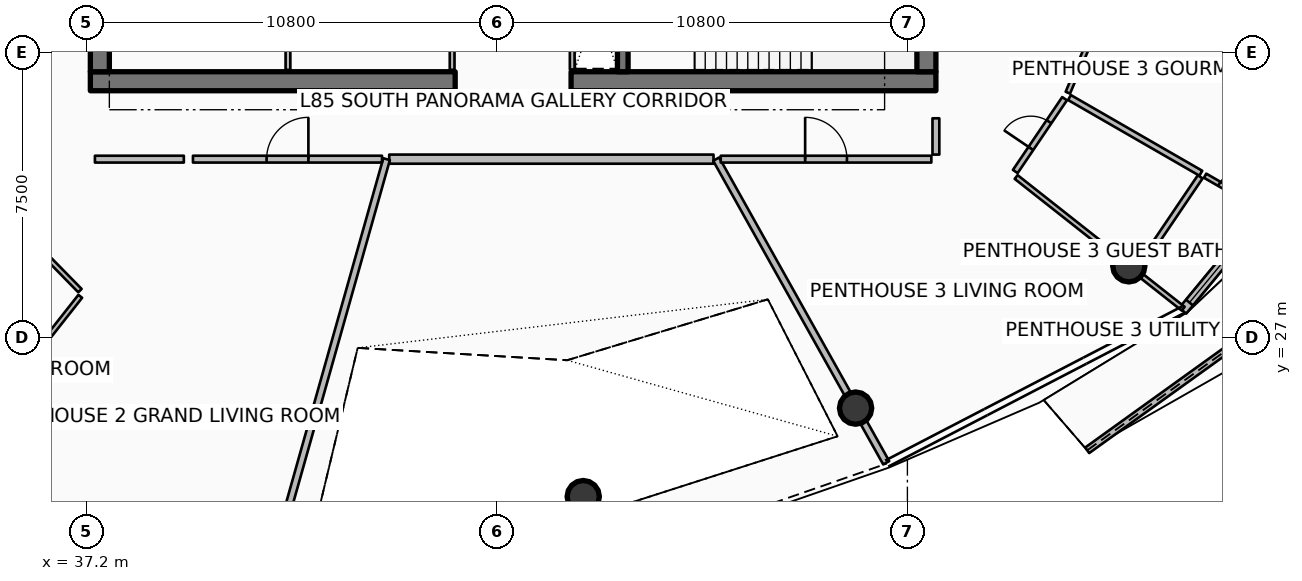
"""IFC4 building model, lengths in metres.
Left out: names, types, materials, properties, quantities, classifications, styles, units other than length and angle.
Written with IfcOpenShell. Run it as: python <this file> out.ifc"""

import sys

from ifc_helpers import new_model, si_unit, direction, frame, frame_2d, origin, origin_2d, place, context, subcontext, project, spatial, polyline, rectangle, circle, outline, extrude, element, fill, save


model = new_model("IFC4")
c1 = context("Model", 3, precision=1e-05, world=origin(), true_north=direction((0.0, 1.0)))
c2 = subcontext(c1, "Body", "Model", "MODEL_VIEW")
j1 = project(units=[si_unit("LENGTHUNIT", "METRE"), si_unit("PLANEANGLEUNIT", "RADIAN")], contexts=[c1])
p1 = place(None, origin())
s1 = spatial("IfcSite", under=j1, at=p1, CompositionType="ELEMENT")
p2 = place(p1, origin())
s2 = spatial("IfcBuilding", under=s1, at=p2, CompositionType="ELEMENT")
p3 = place(p2, frame((0.0, 0.0, 338.9)))
s3 = spatial("IfcBuildingStorey", under=s2, at=p3, CompositionType="ELEMENT", Elevation=338.9)
p4 = place(p3, frame((37.3, 33.75, 0.0), z_axis=(0.0, 0.0, 1.0), x_axis=(1.0, 0.0, 0.0)))
e1 = element("IfcWall", 1, at=p4, inside=s3, PredefinedType="SHEAR", context=c2, shape_type="SweptSolid", body=[
    extrude(rectangle(XDim=9.6, YDim=0.5, at=frame_2d((4.8, 0.0))), origin(), (0.0, 0.0, 1.0), 4.2),
])
p5 = place(p3, frame((49.95, 33.75, 0.0), z_axis=(0.0, 0.0, 1.0), x_axis=(1.0, 0.0, 0.0)))
e2 = element("IfcWall", 2, at=p5, inside=s3, PredefinedType="SHEAR", context=c2, shape_type="SweptSolid", body=[
    extrude(rectangle(XDim=9.6, YDim=0.5, at=frame_2d((4.8, 0.0))), origin(), (0.0, 0.0, 1.0), 4.2),
])
for number, where, z_axis, x_axis in (
    (3, (37.55, 34.0, 0.0), (0.0, 0.0, 1.0), (0.0, 1.0, 0.0)),
    (4, (59.3, 34.0, 0.0), (0.0, 0.0, 1.0), (0.0, 1.0, 0.0)),
):
    element("IfcWall", number, at=place(p3, frame(where, z_axis=z_axis, x_axis=x_axis)), inside=s3, PredefinedType="SHEAR", context=c2, shape_type="SweptSolid", body=[
        extrude(rectangle(XDim=16.0, YDim=0.5, at=frame_2d((8.0, 0.0))), origin(), (0.0, 0.0, 1.0), 4.2),
    ])
p6 = place(p3, frame((51.31, 34.0, 0.0), z_axis=(0.0, 0.0, 1.0), x_axis=(0.0, 1.0, 0.0)))
e5 = element("IfcWall", 5, at=p6, inside=s3, PredefinedType="SHEAR", context=c2, shape_type="SweptSolid", body=[
    extrude(rectangle(XDim=3.5, YDim=0.28, at=frame_2d((1.75, 0.0))), origin(), (0.0, 0.0, 1.0), 4.2),
])
for number, where, z_axis, x_axis in (
    (6, (50.27, 22.821, 0.0), (0.0, 0.0, 1.0), (1.0, 0.0, 0.0)),
    (7, (57.437, 25.149, 0.0), (0.0, 0.0, 1.0), (1.0, 0.0, 0.0)),
    (8, (64.626, 28.893, 0.0), (0.0, 0.0, 1.0), (1.0, 0.0, 0.0)),
):
    element("IfcColumn", number, at=place(p3, frame(where, z_axis=z_axis, x_axis=x_axis)), inside=s3, PredefinedType="COLUMN", context=c2, shape_type="SweptSolid", body=[
        extrude(circle(Radius=0.425, at=origin_2d()), origin(), (0.0, 0.0, 1.0), 3.8),
    ])
p7 = place(p3, frame((63.531, 24.039, 0.0), z_axis=(0.0, 0.0, 1.0), x_axis=(0.812019730163, 0.583629983659, 0.0)))
e9 = element("IfcWall", 9, at=p7, inside=s3, PredefinedType="PARAPET", context=c2, shape_type="SweptSolid", body=[
    extrude(outline(polyline([(0.0, 0.0), (9.954, 0.0), (9.954, 1.632), (4.977, 1.418), (0.0, 1.233), (0.0, 0.0)])), frame((0.0, 0.09, 0.0), z_axis=(0.0, -1.0, 0.0), x_axis=(1.0, 0.0, 0.0)), (0.0, 0.0, 1.0), 0.18),
])
p8 = place(p3, frame((66.045, 27.711, 0.0), z_axis=(0.0, 0.0, 1.0), x_axis=(0.636803612721, 0.771026042897, 0.0)))
e10 = element("IfcWall", 10, at=p8, inside=s3, PredefinedType="SOLIDWALL", context=c2, shape_type="SweptSolid", body=[
    extrude(rectangle(XDim=9.728, YDim=0.24, at=frame_2d((4.864, 0.0))), origin(), (0.0, 0.0, 1.0), 2.75),
])
p9 = place(p8, frame((7.508, 0.0, 0.0)))
e11 = element("IfcOpeningElement", 11, at=p9, cuts=e10, PredefinedType="OPENING", context=c2, shape_type="SweptSolid", body=[
    extrude(rectangle(XDim=1.45, YDim=2.15, at=frame_2d((0.725, 1.075))), frame((0.0, 0.13, 0.0), z_axis=(0.0, -1.0, 0.0), x_axis=(1.0, 0.0, 0.0)), (0.0, 0.0, 1.0), 0.26),
])
p10 = place(p8, frame((0.28, 0.0, 0.65)))
e12 = element("IfcOpeningElement", 12, at=p10, cuts=e10, PredefinedType="OPENING", context=c2, shape_type="SweptSolid", body=[
    extrude(rectangle(XDim=1.6, YDim=1.5, at=frame_2d((0.8, 0.75))), frame((0.0, 0.13, 0.0), z_axis=(0.0, -1.0, 0.0), x_axis=(1.0, 0.0, 0.0)), (0.0, 0.0, 1.0), 0.26),
])
for number, where, z_axis, x_axis in (
    (13, (46.82, 34.05, 0.0), (0.0, 0.0, 1.0), (0.0, 1.0, 0.0)),
    (14, (42.5, 34.05, 0.0), (0.0, 0.0, 1.0), (0.0, 1.0, 0.0)),
):
    element("IfcWall", number, at=place(p3, frame(where, z_axis=z_axis, x_axis=x_axis)), inside=s3, PredefinedType="PARTITIONING", context=c2, shape_type="SweptSolid", body=[
        extrude(rectangle(XDim=2.03, YDim=0.125, at=frame_2d((1.015, 0.0))), origin(), (0.0, 0.0, 1.0), 3.24),
    ])
p11 = place(p3, frame((49.98, 34.06, 0.0), z_axis=(0.0, 0.0, 1.0), x_axis=(0.0, 1.0, 0.0)))
e15 = element("IfcWall", 15, at=p11, inside=s3, PredefinedType="PARTITIONING", context=c2, shape_type="SweptSolid", body=[
    extrude(rectangle(XDim=3.4, YDim=0.125, at=frame_2d((1.7, 0.0))), origin(), (0.0, 0.0, 1.0), 3.24),
])
p12 = place(p3, frame((45.165, 31.7, 0.0), z_axis=(0.0, 0.0, 1.0), x_axis=(1.0, 0.0, 0.0)))
e16 = element("IfcWall", 16, at=p12, inside=s3, PredefinedType="SOLIDWALL", context=c2, shape_type="SweptSolid", body=[
    extrude(rectangle(XDim=8.533, YDim=0.24, at=frame_2d((4.267, 0.0))), origin(), (0.0, 0.0, 1.0), 3.24),
])
p13 = place(p3, frame((45.095, 31.7, 0.0), z_axis=(0.0, 0.0, 1.0), x_axis=(-0.271453030279, -0.962451688321, 0.0)))
e17 = element("IfcWall", 17, at=p13, inside=s3, PredefinedType="PARTITIONING", context=c2, shape_type="SweptSolid", body=[
    extrude(rectangle(XDim=12.191, YDim=0.18, at=frame_2d((6.096, 0.0))), origin(), (0.0, 0.0, 1.0), 3.24),
])
p14 = place(p3, frame((53.768, 31.7, 0.0), z_axis=(0.0, 0.0, 1.0), x_axis=(0.488623665245, -0.872494649704, 0.0)))
e18 = element("IfcWall", 18, at=p14, inside=s3, PredefinedType="PARTITIONING", context=c2, shape_type="SweptSolid", body=[
    extrude(rectangle(XDim=9.157, YDim=0.18, at=frame_2d((4.579, 0.0))), origin(), (0.0, 0.0, 1.0), 3.24),
])
p15 = place(p3, frame((40.0, 31.7, 0.0), z_axis=(0.0, 0.0, 1.0), x_axis=(1.0, 0.0, 0.0)))
e19 = element("IfcWall", 19, at=p15, inside=s3, PredefinedType="PARTITIONING", context=c2, shape_type="SweptSolid", body=[
    extrude(rectangle(XDim=4.975, YDim=0.18, at=frame_2d((2.488, 0.0))), origin(), (0.0, 0.0, 1.0), 3.24),
])
p16 = place(p15, frame((1.938, 0.0, 0.0)))
e20 = element("IfcOpeningElement", 20, at=p16, cuts=e19, PredefinedType="OPENING", context=c2, shape_type="SweptSolid", body=[
    extrude(rectangle(XDim=1.1, YDim=2.1, at=frame_2d((0.55, 1.05))), frame((0.0, 0.1, 0.0), z_axis=(0.0, -1.0, 0.0), x_axis=(1.0, 0.0, 0.0)), (0.0, 0.0, 1.0), 0.2),
])
p17 = place(p3, frame((37.42, 31.7, 0.0), z_axis=(0.0, 0.0, 1.0), x_axis=(1.0, 0.0, 0.0)))
e21 = element("IfcWall", 21, at=p17, inside=s3, PredefinedType="PARTITIONING", context=c2, shape_type="SweptSolid", body=[
    extrude(rectangle(XDim=2.34, YDim=0.18, at=frame_2d((1.17, 0.0))), origin(), (0.0, 0.0, 1.0), 3.24),
])
p18 = place(p3, frame((37.035, 28.091, 0.0), z_axis=(0.0, 0.0, 1.0), x_axis=(-0.619085814128, -0.785323344072, 0.0)))
e22 = element("IfcWall", 22, at=p18, inside=s3, PredefinedType="PARTITIONING", context=c2, shape_type="SweptSolid", body=[
    extrude(rectangle(XDim=7.415, YDim=0.125, at=frame_2d((3.708, 0.0))), origin(), (0.0, 0.0, 1.0), 3.24),
])
p19 = place(p3, frame((34.001, 31.33, 0.0), z_axis=(0.0, 0.0, 1.0), x_axis=(0.699699856998, -0.714436918221, 0.0)))
e23 = element("IfcWall", 23, at=p19, inside=s3, PredefinedType="PARTITIONING", context=c2, shape_type="SweptSolid", body=[
    extrude(rectangle(XDim=4.324, YDim=0.125, at=frame_2d((2.162, 0.0))), origin(), (0.0, 0.0, 1.0), 3.24),
])
p20 = place(p19, frame((1.712, 0.0, 0.0)))
e24 = element("IfcOpeningElement", 24, at=p20, cuts=e23, PredefinedType="OPENING", context=c2, shape_type="SweptSolid", body=[
    extrude(rectangle(XDim=0.9, YDim=2.08, at=frame_2d((0.45, 1.04))), frame((0.0, 0.073, 0.0), z_axis=(0.0, -1.0, 0.0), x_axis=(1.0, 0.0, 0.0)), (0.0, 0.0, 1.0), 0.145),
])
p21 = place(p3, frame((53.888, 31.7, 0.0), z_axis=(0.0, 0.0, 1.0), x_axis=(1.0, 0.0, 0.0)))
e25 = element("IfcWall", 25, at=p21, inside=s3, PredefinedType="PARTITIONING", context=c2, shape_type="SweptSolid", body=[
    extrude(rectangle(XDim=5.542, YDim=0.18, at=frame_2d((2.771, 0.0))), origin(), (0.0, 0.0, 1.0), 3.24),
])
p22 = place(p21, frame((2.221, 0.0, 0.0)))
e26 = element("IfcOpeningElement", 26, at=p22, cuts=e25, PredefinedType="OPENING", context=c2, shape_type="SweptSolid", body=[
    extrude(rectangle(XDim=1.1, YDim=2.1, at=frame_2d((0.55, 1.05))), frame((0.0, 0.1, 0.0), z_axis=(0.0, -1.0, 0.0), x_axis=(1.0, 0.0, 0.0)), (0.0, 0.0, 1.0), 0.2),
])
p23 = place(p3, frame((59.55, 31.82, 0.0), z_axis=(0.0, 0.0, 1.0), x_axis=(0.0, 1.0, 0.0)))
e27 = element("IfcWall", 27, at=p23, inside=s3, PredefinedType="PARTITIONING", context=c2, shape_type="SweptSolid", body=[
    extrude(rectangle(XDim=0.955, YDim=0.18, at=frame_2d((0.477, 0.0))), origin(), (0.0, 0.0, 1.0), 3.24),
])
p24 = place(p3, frame((61.661, 31.23, 0.0), z_axis=(0.0, 0.0, 1.0), x_axis=(0.785321366699, -0.61908832246, 0.0)))
e28 = element("IfcWall", 28, at=p24, inside=s3, PredefinedType="PARTITIONING", context=c2, shape_type="SweptSolid", body=[
    extrude(rectangle(XDim=5.597, YDim=0.125, at=frame_2d((2.799, 0.0))), origin(), (0.0, 0.0, 1.0), 3.24),
])
p25 = place(p3, frame((61.639, 31.375, 0.0), z_axis=(0.0, 0.0, 1.0), x_axis=(0.56062651507, 0.828068783738, 0.0)))
e29 = element("IfcWall", 29, at=p25, inside=s3, PredefinedType="PARTITIONING", context=c2, shape_type="SweptSolid", body=[
    extrude(rectangle(XDim=2.314, YDim=0.15, at=frame_2d((1.157, 0.0))), origin(), (0.0, 0.0, 1.0), 3.24),
])
p26 = place(p25, frame((0.732, 0.0, 0.0)))
e30 = element("IfcOpeningElement", 30, at=p26, cuts=e29, PredefinedType="OPENING", context=c2, shape_type="SweptSolid", body=[
    extrude(rectangle(XDim=0.85, YDim=2.06, at=frame_2d((0.425, 1.03))), frame((0.0, 0.085, 0.0), z_axis=(0.0, -1.0, 0.0), x_axis=(1.0, 0.0, 0.0)), (0.0, 0.0, 1.0), 0.17),
])
p27 = place(p3, frame((64.874, 28.825, 0.0), z_axis=(0.0, 0.0, 1.0), x_axis=(0.560532780406, 0.82813223708, 0.0)))
e31 = element("IfcWall", 31, at=p27, inside=s3, PredefinedType="PARTITIONING", context=c2, shape_type="SweptSolid", body=[
    extrude(rectangle(XDim=2.91, YDim=0.15, at=frame_2d((1.455, 0.0))), origin(), (0.0, 0.0, 1.0), 3.24),
])
p28 = place(p3, frame((63.065, 33.321, 0.0), z_axis=(0.0, 0.0, 1.0), x_axis=(0.866490095299, -0.499194265541, 0.0)))
e32 = element("IfcWall", 32, at=p28, inside=s3, PredefinedType="PARTITIONING", context=c2, shape_type="SweptSolid", body=[
    extrude(rectangle(XDim=3.989, YDim=0.15, at=frame_2d((1.994, 0.0))), origin(), (0.0, 0.0, 1.0), 3.24),
])
p29 = place(p3, frame((66.634, 31.265, 0.0), z_axis=(0.0, 0.0, 1.0), x_axis=(0.866444624685, -0.499273184094, 0.0)))
e33 = element("IfcWall", 33, at=p29, inside=s3, PredefinedType="PARTITIONING", context=c2, shape_type="SweptSolid", body=[
    extrude(rectangle(XDim=1.709, YDim=0.125, at=frame_2d((0.855, 0.0))), origin(), (0.0, 0.0, 1.0), 3.24),
])
p30 = place(p29, frame((0.43, 0.0, 0.0)))
e34 = element("IfcOpeningElement", 34, at=p30, cuts=e33, PredefinedType="OPENING", context=c2, shape_type="SweptSolid", body=[
    extrude(rectangle(XDim=0.85, YDim=2.06, at=frame_2d((0.425, 1.03))), frame((0.0, 0.073, 0.0), z_axis=(0.0, -1.0, 0.0), x_axis=(1.0, 0.0, 0.0)), (0.0, 0.0, 1.0), 0.145),
])
p31 = place(p3, frame((63.021, 33.448, 0.0), z_axis=(0.0, 0.0, 1.0), x_axis=(0.388350881923, 0.921511580236, 0.0)))
e35 = element("IfcWall", 35, at=p31, inside=s3, PredefinedType="PARTITIONING", context=c2, shape_type="SweptSolid", body=[
    extrude(rectangle(XDim=4.085, YDim=0.125, at=frame_2d((2.042, 0.0))), origin(), (0.0, 0.0, 1.0), 3.24),
])
p32 = place(p31, frame((1.593, 0.0, 0.0)))
e36 = element("IfcOpeningElement", 36, at=p32, cuts=e35, PredefinedType="OPENING", context=c2, shape_type="SweptSolid", body=[
    extrude(rectangle(XDim=0.9, YDim=2.08, at=frame_2d((0.45, 1.04))), frame((0.0, 0.073, 0.0), z_axis=(0.0, -1.0, 0.0), x_axis=(1.0, 0.0, 0.0)), (0.0, 0.0, 1.0), 0.145),
])
p33 = place(p10, origin())
e37 = element("IfcWindow", 37, at=p33, inside=s3, PartitioningType="SINGLE_PANEL", PredefinedType="WINDOW", context=c2, shape_type="SweptSolid", body=[
    extrude(rectangle(XDim=1.6, YDim=1.5, at=frame_2d((0.8, 0.75))), frame((0.0, 0.03, 0.0), z_axis=(0.0, -1.0, 0.0), x_axis=(1.0, 0.0, 0.0)), (0.0, 0.0, 1.0), 0.06),
])
fill(e12, e37)
p34 = place(p16, origin())
e38 = element("IfcDoor", 38, at=p34, inside=s3, OperationType="SINGLE_SWING_RIGHT", PredefinedType="DOOR", context=c2, shape_type="SweptSolid", body=[
    extrude(rectangle(XDim=1.1, YDim=2.1, at=frame_2d((0.55, 1.05))), frame((0.0, 0.025, 0.0), z_axis=(0.0, -1.0, 0.0), x_axis=(1.0, 0.0, 0.0)), (0.0, 0.0, 1.0), 0.05),
])
fill(e20, e38)
p35 = place(p22, origin())
e39 = element("IfcDoor", 39, at=p35, inside=s3, OperationType="SINGLE_SWING_LEFT", PredefinedType="DOOR", context=c2, shape_type="SweptSolid", body=[
    extrude(rectangle(XDim=1.1, YDim=2.1, at=frame_2d((0.55, 1.05))), frame((0.0, 0.025, 0.0), z_axis=(0.0, -1.0, 0.0), x_axis=(1.0, 0.0, 0.0)), (0.0, 0.0, 1.0), 0.05),
])
fill(e26, e39)
p36 = place(p26, origin())
e40 = element("IfcDoor", 40, at=p36, inside=s3, OperationType="SINGLE_SWING_LEFT", PredefinedType="DOOR", context=c2, shape_type="SweptSolid", body=[
    extrude(rectangle(XDim=0.85, YDim=2.06, at=frame_2d((0.425, 1.03))), frame((0.0, 0.025, 0.0), z_axis=(0.0, -1.0, 0.0), x_axis=(1.0, 0.0, 0.0)), (0.0, 0.0, 1.0), 0.05),
])
fill(e30, e40)
p37 = place(p30, origin())
e41 = element("IfcDoor", 41, at=p37, inside=s3, OperationType="SINGLE_SWING_RIGHT", PredefinedType="DOOR", context=c2, shape_type="SweptSolid", body=[
    extrude(rectangle(XDim=0.85, YDim=2.06, at=frame_2d((0.425, 1.03))), frame((0.0, 0.025, 0.0), z_axis=(0.0, -1.0, 0.0), x_axis=(1.0, 0.0, 0.0)), (0.0, 0.0, 1.0), 0.05),
])
fill(e34, e41)
save(model, sys.argv[1])
